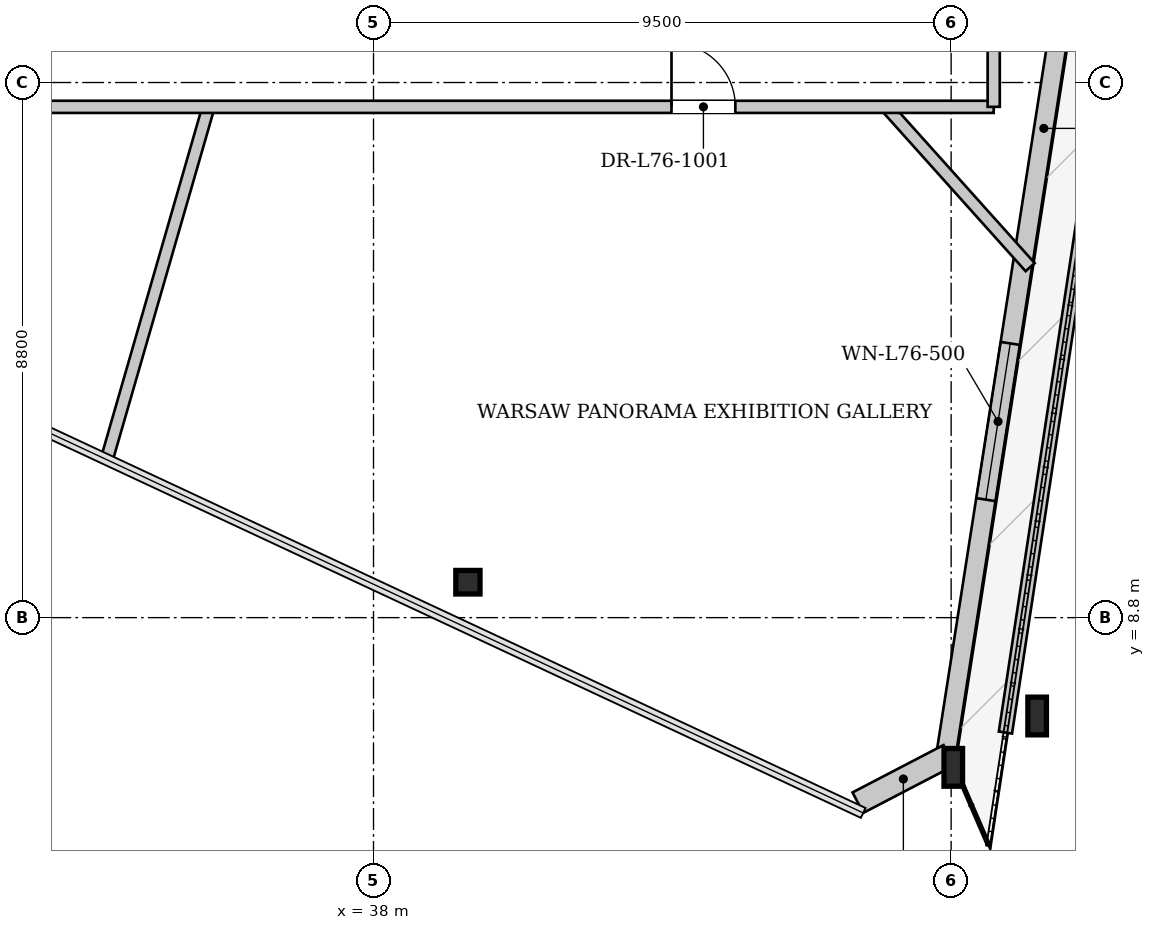
"""IFC4 building model, lengths in metres.
Left out: names, types, materials, properties, quantities, classifications, styles, units other than length and angle.
Written with IfcOpenShell. Run it as: python <this file> out.ifc"""

import sys

from ifc_helpers import new_model, si_unit, direction, frame, frame_2d, origin, origin_2d, place, context, subcontext, project, spatial, rectangle, i_section, extrude, source, transform, mapped, element, fill, save


model = new_model("IFC4")
c1 = context("Model", 3, precision=1e-05, world=origin(), true_north=direction((0.0, 1.0)))
c2 = subcontext(c1, "Body", "Model", "MODEL_VIEW")
j1 = project(units=[si_unit("LENGTHUNIT", "METRE"), si_unit("PLANEANGLEUNIT", "RADIAN")], contexts=[c1])
p1 = place(None, origin())
s1 = spatial("IfcSite", under=j1, at=p1, CompositionType="ELEMENT")
p2 = place(p1, origin())
s2 = spatial("IfcBuilding", under=s1, at=p2, CompositionType="ELEMENT")
p3 = place(p2, frame((0.0, 0.0, 286.1)))
s3 = spatial("IfcBuildingStorey", under=s2, at=p3, CompositionType="ELEMENT", Elevation=286.1)
m1 = source(origin(), c2, "Body", "SweptSolid", [
    extrude(i_section(OverallWidth=0.398, OverallDepth=0.387, WebThickness=0.019, FlangeThickness=0.029, at=origin_2d()), origin(), (0.0, 0.0, 1.0), 4.713),
])
p4 = place(p3, frame((30.518, 12.843, 0.0), z_axis=(0.446241604847, -0.176134369222, 0.877408179858), x_axis=(0.367141948921, 0.930164925883, 0.0)))
e1 = element("IfcColumn", 1, at=p4, inside=s3, PredefinedType="COLUMN", context=c2, shape_type="MappedRepresentation", body=[
    mapped(m1, transform((0.0, 0.0, 0.0), x_axis=(1.0, 0.0, 0.0), y_axis=(0.0, 1.0, 0.0), z_axis=(0.0, 0.0, 1.0), scale=1.0)),
])
m2 = source(origin(), c2, "Body", "SweptSolid", [
    extrude(i_section(OverallWidth=0.398, OverallDepth=0.387, WebThickness=0.019, FlangeThickness=0.029, at=origin_2d()), origin(), (0.0, 0.0, 1.0), 4.861),
])
p5 = place(p3, frame((38.286, 9.216, 0.0), z_axis=(0.521153916332, 0.068710346718, 0.850692355523), x_axis=(-0.130711561405, 0.991420439428, 0.0)))
e2 = element("IfcColumn", 2, at=p5, inside=s3, PredefinedType="COLUMN", context=c2, shape_type="MappedRepresentation", body=[
    mapped(m2, transform((0.0, 0.0, 0.0), x_axis=(1.0, 0.0, 0.0), y_axis=(0.0, 1.0, 0.0), z_axis=(0.0, 0.0, 1.0), scale=1.0)),
])
m3 = source(origin(), c2, "Body", "SweptSolid", [
    extrude(i_section(OverallWidth=0.305, OverallDepth=0.62, WebThickness=0.021, FlangeThickness=0.04, at=origin_2d()), origin(), (0.0, 0.0, 1.0), 5.303),
])
p6 = place(p3, frame((46.054, 5.589, 0.0), z_axis=(0.558750446217, 0.282528754094, 0.779727799916), x_axis=(-0.451238365441, 0.892403461196, 0.0)))
e3 = element("IfcColumn", 3, at=p6, inside=s3, PredefinedType="COLUMN", context=c2, shape_type="MappedRepresentation", body=[
    mapped(m3, transform((0.0, 0.0, 0.0), x_axis=(1.0, 0.0, 0.0), y_axis=(0.0, 1.0, 0.0), z_axis=(0.0, 0.0, 1.0), scale=1.0)),
])
m4 = source(origin(), c2, "Body", "SweptSolid", [
    extrude(i_section(OverallWidth=0.305, OverallDepth=0.62, WebThickness=0.021, FlangeThickness=0.04, at=origin_2d()), origin(), (0.0, 0.0, 1.0), 5.215),
])
p7 = place(p3, frame((47.55, 6.368, 0.0), z_axis=(0.523187937414, 0.312433455109, 0.792880645667), x_axis=(-0.512709660243, 0.858562056169, 0.0)))
e4 = element("IfcColumn", 4, at=p7, inside=s3, PredefinedType="COLUMN", context=c2, shape_type="MappedRepresentation", body=[
    mapped(m4, transform((0.0, 0.0, 0.0), x_axis=(1.0, 0.0, 0.0), y_axis=(0.0, 1.0, 0.0), z_axis=(0.0, 0.0, 1.0), scale=1.0)),
])
p8 = place(p3, frame((50.774, 28.055, 0.0), z_axis=(0.0, 0.0, 1.0), x_axis=(-0.154256631158, -0.988030815179, 0.0)))
e5 = element("IfcWall", 5, at=p8, inside=s3, PredefinedType="SOLIDWALL", context=c2, shape_type="SweptSolid", body=[
    extrude(rectangle(XDim=21.925, YDim=0.32, at=frame_2d((10.962, 0.0))), origin(), (0.0, 0.0, 1.0), 3.662),
])
p9 = place(p8, frame((6.266, 0.0, 0.0)))
e6 = element("IfcOpeningElement", 6, at=p9, cuts=e5, PredefinedType="OPENING", context=c2, shape_type="SweptSolid", body=[
    extrude(rectangle(XDim=1.5, YDim=2.3, at=frame_2d((0.75, 1.15))), frame((0.0, 0.17, 0.0), z_axis=(0.0, -1.0, 0.0), x_axis=(1.0, 0.0, 0.0)), (0.0, 0.0, 1.0), 0.34),
])
p10 = place(p8, frame((14.924, 0.0, 0.65)))
e7 = element("IfcOpeningElement", 7, at=p10, cuts=e5, PredefinedType="OPENING", context=c2, shape_type="SweptSolid", body=[
    extrude(rectangle(XDim=2.6, YDim=2.35, at=frame_2d((1.3, 1.175))), frame((0.0, 0.17, 0.0), z_axis=(0.0, -1.0, 0.0), x_axis=(1.0, 0.0, 0.0)), (0.0, 0.0, 1.0), 0.34),
])
p11 = place(p3, frame((47.463, 6.536, 0.0), z_axis=(0.0, 0.0, 1.0), x_axis=(-0.887015338526, -0.46173995844, 0.0)))
e8 = element("IfcWall", 8, at=p11, inside=s3, PredefinedType="SOLIDWALL", context=c2, shape_type="SweptSolid", body=[
    extrude(rectangle(XDim=1.687, YDim=0.38, at=frame_2d((0.844, 0.0))), origin(), (0.0, 0.0, 1.0), 3.662),
])
p12 = place(p3, frame((48.393, 6.91, 0.0), z_axis=(0.0, 0.0, 1.0), x_axis=(0.150189659266, 0.98865720361, 0.0)))
e9 = element("IfcWall", 9, at=p12, inside=s3, PredefinedType="PARAPET", context=c2, shape_type="SweptSolid", body=[
    extrude(rectangle(XDim=19.591, YDim=0.22, at=frame_2d((9.795, 0.0))), origin(), (0.0, 0.0, 1.0), 0.3),
])
p13 = place(p3, frame((35.287, 17.2, 0.0), z_axis=(0.0, 0.0, 1.0), x_axis=(-0.277312132805, -0.960779881658, 0.0)))
e10 = element("IfcWall", 10, at=p13, inside=s3, PredefinedType="PARTITIONING", context=c2, shape_type="SweptSolid", body=[
    extrude(rectangle(XDim=6.009, YDim=0.2, at=frame_2d((3.004, 0.0))), origin(), (0.0, 0.0, 1.0), 4.12),
])
p14 = place(p3, frame((46.434, 17.2, 0.0), z_axis=(0.0, 0.0, 1.0), x_axis=(0.667851981074, -0.744294116177, 0.0)))
e11 = element("IfcWall", 11, at=p14, inside=s3, PredefinedType="PARTITIONING", context=c2, shape_type="SweptSolid", body=[
    extrude(rectangle(XDim=3.542, YDim=0.2, at=frame_2d((1.771, 0.0))), origin(), (0.0, 0.0, 1.0), 4.12),
])
p15 = place(p3, frame((27.8, 17.2, 0.0), z_axis=(0.0, 0.0, 1.0), x_axis=(1.0, 0.0, 0.0)))
e12 = element("IfcWall", 12, at=p15, inside=s3, PredefinedType="PARTITIONING", context=c2, shape_type="SweptSolid", body=[
    extrude(rectangle(XDim=20.4, YDim=0.2, at=frame_2d((10.2, 0.0))), origin(), (0.0, 0.0, 1.0), 3.865),
])
p16 = place(p15, frame((0.3, 0.0, 0.0)))
e13 = element("IfcOpeningElement", 13, at=p16, cuts=e12, PredefinedType="OPENING", context=c2, shape_type="SweptSolid", body=[
    extrude(rectangle(XDim=1.05, YDim=2.2, at=frame_2d((0.525, 1.1))), frame((0.0, 0.11, 0.0), z_axis=(0.0, -1.0, 0.0), x_axis=(1.0, 0.0, 0.0)), (0.0, 0.0, 1.0), 0.22),
])
p17 = place(p15, frame((15.101, 0.0, 0.0)))
e14 = element("IfcOpeningElement", 14, at=p17, cuts=e12, PredefinedType="OPENING", context=c2, shape_type="SweptSolid", body=[
    extrude(rectangle(XDim=1.05, YDim=2.2, at=frame_2d((0.525, 1.1))), frame((0.0, 0.11, 0.0), z_axis=(0.0, -1.0, 0.0), x_axis=(1.0, 0.0, 0.0)), (0.0, 0.0, 1.0), 0.22),
])
p18 = place(p3, frame((48.2, 17.2, 0.0), z_axis=(0.0, 0.0, 1.0), x_axis=(0.0, 1.0, 0.0)))
e15 = element("IfcWall", 15, at=p18, inside=s3, PredefinedType="PARTITIONING", context=c2, shape_type="SweptSolid", body=[
    extrude(rectangle(XDim=3.4, YDim=0.2, at=frame_2d((1.7, 0.0))), origin(), (0.0, 0.0, 1.0), 3.745),
])
p19 = place(p18, frame((2.05, 0.0, 0.0)))
e16 = element("IfcOpeningElement", 16, at=p19, cuts=e15, PredefinedType="OPENING", context=c2, shape_type="SweptSolid", body=[
    extrude(rectangle(XDim=1.05, YDim=2.2, at=frame_2d((0.525, 1.1))), frame((0.0, 0.11, 0.0), z_axis=(0.0, -1.0, 0.0), x_axis=(1.0, 0.0, 0.0)), (0.0, 0.0, 1.0), 0.22),
])
m5 = source(origin(), c2, "Body", "SweptSolid", [
    extrude(rectangle(XDim=2.6, YDim=2.35, at=frame_2d((1.3, 1.175))), frame((0.0, 0.03, 0.0), z_axis=(0.0, -1.0, 0.0), x_axis=(1.0, 0.0, 0.0)), (0.0, 0.0, 1.0), 0.06),
])
p20 = place(p10, origin())
e17 = element("IfcWindow", 17, at=p20, inside=s3, PartitioningType="SINGLE_PANEL", PredefinedType="WINDOW", context=c2, shape_type="MappedRepresentation", body=[
    mapped(m5, transform((0.0, 0.0, 0.0), x_axis=(1.0, 0.0, 0.0), y_axis=(0.0, 1.0, 0.0), z_axis=(0.0, 0.0, 1.0), scale=1.0)),
])
fill(e7, e17)
m6 = source(origin(), c2, "Body", "SweptSolid", [
    extrude(rectangle(XDim=1.05, YDim=2.2, at=frame_2d((0.525, 1.1))), frame((0.0, 0.025, 0.0), z_axis=(0.0, -1.0, 0.0), x_axis=(1.0, 0.0, 0.0)), (0.0, 0.0, 1.0), 0.05),
])
p21 = place(p17, origin())
e18 = element("IfcDoor", 18, at=p21, inside=s3, OperationType="SINGLE_SWING_LEFT", PredefinedType="DOOR", context=c2, shape_type="MappedRepresentation", body=[
    mapped(m6, transform((0.0, 0.0, 0.0), x_axis=(1.0, 0.0, 0.0), y_axis=(0.0, 1.0, 0.0), z_axis=(0.0, 0.0, 1.0), scale=1.0)),
])
fill(e14, e18)
save(model, sys.argv[1])
